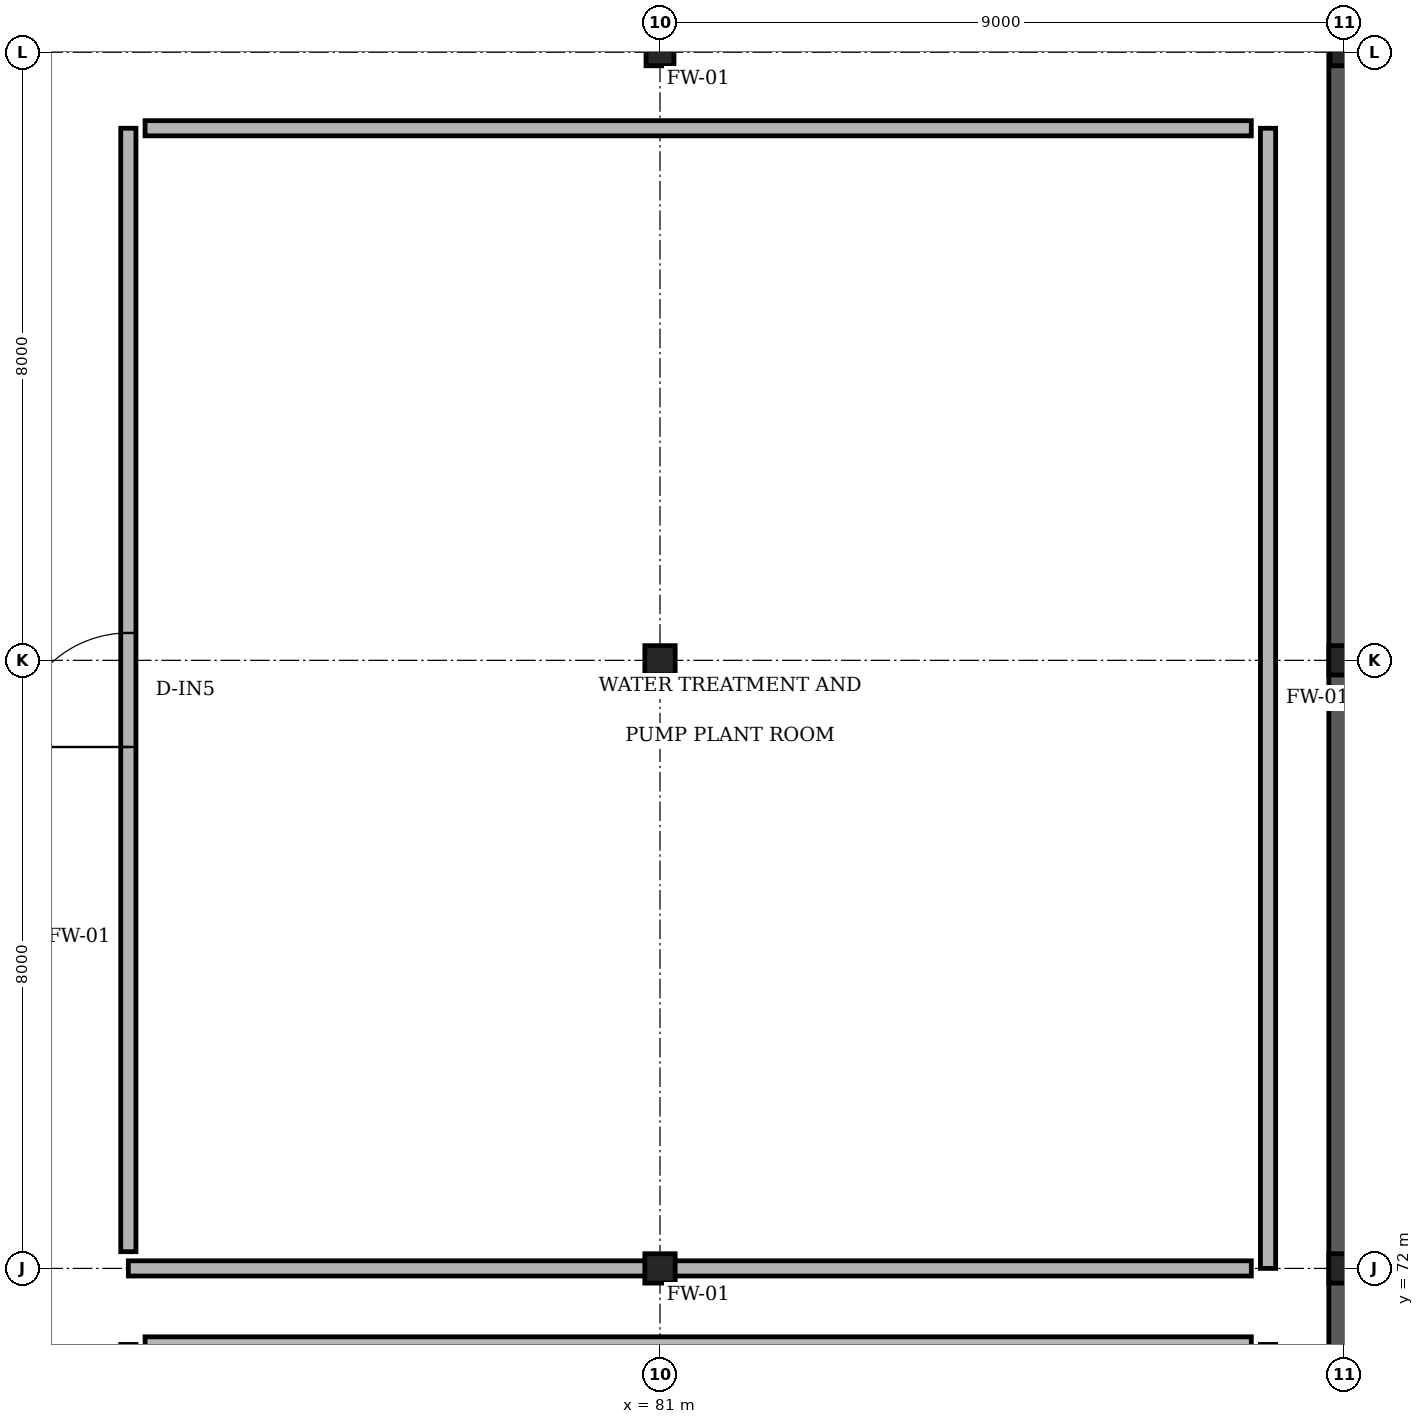
"""IFC4 building model, lengths in metres.
Left out: names, types, materials, properties, quantities, classifications, styles, units other than length and angle.
Written with IfcOpenShell. Run it as: python <this file> out.ifc"""

import sys

from ifc_helpers import new_model, si_unit, direction, frame, frame_2d, origin, origin_2d, place, context, subcontext, project, spatial, rectangle, i_section, extrude, element, fill, save


model = new_model("IFC4")
c1 = context("Model", 3, precision=1e-05, world=origin(), true_north=direction((0.0, 1.0)))
c2 = subcontext(c1, "Body", "Model", "MODEL_VIEW")
j1 = project(units=[si_unit("LENGTHUNIT", "METRE"), si_unit("PLANEANGLEUNIT", "RADIAN")], contexts=[c1])
p1 = place(None, origin())
s1 = spatial("IfcSite", under=j1, at=p1, CompositionType="ELEMENT")
p2 = place(p1, origin())
s2 = spatial("IfcBuilding", under=s1, at=p2, CompositionType="ELEMENT")
p3 = place(p2, frame((0.0, 0.0, -4.8)))
s3 = spatial("IfcBuildingStorey", under=s2, at=p3, CompositionType="ELEMENT", Elevation=-4.8)
for number, where, z_axis, x_axis in (
    (1, (81.0, 72.0, -0.35), (0.0, 0.0, 1.0), (1.0, 0.0, 0.0)),
    (2, (81.0, 80.0, -0.35), (0.0, 0.0, 1.0), (1.0, 0.0, 0.0)),
):
    element("IfcColumn", number, at=place(p3, frame(where, z_axis=z_axis, x_axis=x_axis)), inside=s3, PredefinedType="COLUMN", context=c2, shape_type="SweptSolid", body=[
        extrude(i_section(OverallWidth=0.399, OverallDepth=0.386, WebThickness=0.021, FlangeThickness=0.033, FilletRadius=0.015, at=origin_2d()), origin(), (0.0, 0.0, 1.0), 5.15),
    ])
p4 = place(p3, frame((81.0, 88.0, -0.35), z_axis=(0.0, 0.0, 1.0), x_axis=(1.0, 0.0, 0.0)))
e3 = element("IfcColumn", 3, at=p4, inside=s3, PredefinedType="COLUMN", context=c2, shape_type="SweptSolid", body=[
    extrude(i_section(OverallWidth=0.368, OverallDepth=0.356, WebThickness=0.011, FlangeThickness=0.018, FilletRadius=0.015, at=origin_2d()), origin(), (0.0, 0.0, 1.0), 5.15),
])
for number, where, z_axis, x_axis in (
    (4, (90.0, 72.0, -0.35), (0.0, 0.0, 1.0), (1.0, 0.0, 0.0)),
    (5, (90.0, 80.0, -0.35), (0.0, 0.0, 1.0), (1.0, 0.0, 0.0)),
):
    element("IfcColumn", number, at=place(p3, frame(where, z_axis=z_axis, x_axis=x_axis)), inside=s3, PredefinedType="COLUMN", context=c2, shape_type="SweptSolid", body=[
        extrude(i_section(OverallWidth=0.399, OverallDepth=0.386, WebThickness=0.021, FlangeThickness=0.033, FilletRadius=0.015, at=origin_2d()), origin(), (0.0, 0.0, 1.0), 5.15),
    ])
p5 = place(p3, frame((90.0, 88.0, -0.35), z_axis=(0.0, 0.0, 1.0), x_axis=(1.0, 0.0, 0.0)))
e6 = element("IfcColumn", 6, at=p5, inside=s3, PredefinedType="COLUMN", context=c2, shape_type="SweptSolid", body=[
    extrude(i_section(OverallWidth=0.368, OverallDepth=0.356, WebThickness=0.011, FlangeThickness=0.018, FilletRadius=0.015, at=origin_2d()), origin(), (0.0, 0.0, 1.0), 5.15),
])
p6 = place(p3, frame((90.0, 88.7, -0.35), z_axis=(0.0, 0.0, 1.0), x_axis=(0.0, -1.0, 0.0)))
e7 = element("IfcWall", 7, at=p6, inside=s3, PredefinedType="USERDEFINED", context=c2, shape_type="SweptSolid", body=[
    extrude(rectangle(XDim=36.45, YDim=0.4, at=frame_2d((18.225, 0.0))), origin(), (0.0, 0.0, 1.0), 3.9),
])
p7 = place(p3, frame((74.005, 53.22, 0.0), z_axis=(0.0, 0.0, 1.0), x_axis=(0.0, 1.0, 0.0)))
e8 = element("IfcWall", 8, at=p7, inside=s3, PredefinedType="SOLIDWALL", context=c2, shape_type="SweptSolid", body=[
    extrude(rectangle(XDim=17.78, YDim=0.2, at=frame_2d((8.89, 0.0))), origin(), (0.0, 0.0, 1.0), 3.15),
])
p8 = place(p7, frame((8.14, 0.0, 0.0)))
e9 = element("IfcOpeningElement", 9, at=p8, cuts=e8, PredefinedType="OPENING", context=c2, shape_type="SweptSolid", body=[
    extrude(rectangle(XDim=1.5, YDim=2.2, at=frame_2d((0.75, 1.1))), frame((0.0, 0.11, 0.0), z_axis=(0.0, -1.0, 0.0), x_axis=(1.0, 0.0, 0.0)), (0.0, 0.0, 1.0), 0.22),
])
p9 = place(p3, frame((74.225, 71.0, 0.0), z_axis=(0.0, 0.0, 1.0), x_axis=(1.0, 0.0, 0.0)))
e10 = element("IfcWall", 10, at=p9, inside=s3, PredefinedType="SOLIDWALL", context=c2, shape_type="SweptSolid", body=[
    extrude(rectangle(XDim=14.555, YDim=0.2, at=frame_2d((7.277, 0.0))), origin(), (0.0, 0.0, 1.0), 3.15),
])
p10 = place(p3, frame((89.0, 87.0, 0.0), z_axis=(0.0, 0.0, 1.0), x_axis=(0.0, -1.0, 0.0)))
e11 = element("IfcWall", 11, at=p10, inside=s3, PredefinedType="SOLIDWALL", context=c2, shape_type="SweptSolid", body=[
    extrude(rectangle(XDim=15.0, YDim=0.2, at=frame_2d((7.5, 0.0))), origin(), (0.0, 0.0, 1.0), 3.15),
])
p11 = place(p3, frame((88.78, 72.0, 0.0), z_axis=(0.0, 0.0, 1.0), x_axis=(-1.0, 0.0, 0.0)))
e12 = element("IfcWall", 12, at=p11, inside=s3, PredefinedType="SOLIDWALL", context=c2, shape_type="SweptSolid", body=[
    extrude(rectangle(XDim=14.775, YDim=0.2, at=frame_2d((7.388, 0.0))), origin(), (0.0, 0.0, 1.0), 3.15),
])
p12 = place(p3, frame((74.005, 72.22, 0.0), z_axis=(0.0, 0.0, 1.0), x_axis=(0.0, 1.0, 0.0)))
e13 = element("IfcWall", 13, at=p12, inside=s3, PredefinedType="SOLIDWALL", context=c2, shape_type="SweptSolid", body=[
    extrude(rectangle(XDim=14.78, YDim=0.2, at=frame_2d((7.39, 0.0))), origin(), (0.0, 0.0, 1.0), 3.15),
])
p13 = place(p12, frame((6.64, 0.0, 0.0)))
e14 = element("IfcOpeningElement", 14, at=p13, cuts=e13, PredefinedType="OPENING", context=c2, shape_type="SweptSolid", body=[
    extrude(rectangle(XDim=1.5, YDim=2.2, at=frame_2d((0.75, 1.1))), frame((0.0, 0.11, 0.0), z_axis=(0.0, -1.0, 0.0), x_axis=(1.0, 0.0, 0.0)), (0.0, 0.0, 1.0), 0.22),
])
p14 = place(p3, frame((74.225, 87.0, 0.0), z_axis=(0.0, 0.0, 1.0), x_axis=(1.0, 0.0, 0.0)))
e15 = element("IfcWall", 15, at=p14, inside=s3, PredefinedType="SOLIDWALL", context=c2, shape_type="SweptSolid", body=[
    extrude(rectangle(XDim=14.555, YDim=0.2, at=frame_2d((7.277, 0.0))), origin(), (0.0, 0.0, 1.0), 3.15),
])
p15 = place(p13, origin())
e16 = element("IfcDoor", 16, at=p15, inside=s3, OperationType="SINGLE_SWING_LEFT", PredefinedType="DOOR", context=c2, shape_type="SweptSolid", body=[
    extrude(rectangle(XDim=1.5, YDim=2.2, at=frame_2d((0.75, 1.1))), frame((0.0, 0.025, 0.0), z_axis=(0.0, -1.0, 0.0), x_axis=(1.0, 0.0, 0.0)), (0.0, 0.0, 1.0), 0.05),
])
fill(e14, e16)
save(model, sys.argv[1])
